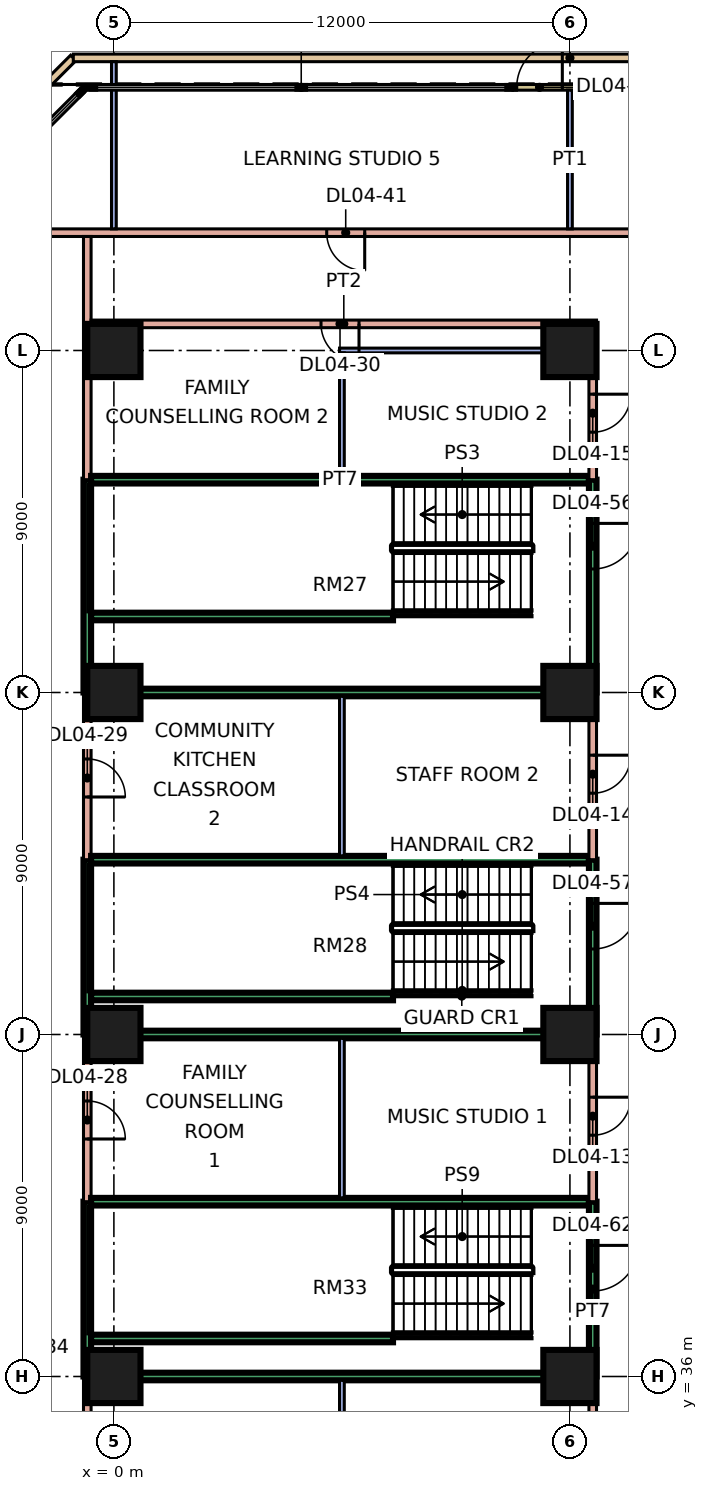
"""IFC4 building model, lengths in metres.
Left out: names, types, materials, properties, quantities, classifications, styles, units other than length and angle.
Written with IfcOpenShell. Run it as: python <this file> out.ifc"""

import sys

from ifc_helpers import new_model, si_unit, direction, frame, frame_2d, origin, origin_2d, place, context, subcontext, project, spatial, rectangle, extrude, element, fill, save


model = new_model("IFC4")
c1 = context("Model", 3, precision=1e-05, world=origin(), true_north=direction((0.0, 1.0)))
c2 = subcontext(c1, "Body", "Model", "MODEL_VIEW")
j1 = project(units=[si_unit("LENGTHUNIT", "METRE"), si_unit("PLANEANGLEUNIT", "RADIAN")], contexts=[c1])
p1 = place(None, origin())
s1 = spatial("IfcSite", under=j1, at=p1, CompositionType="ELEMENT")
p2 = place(p1, origin())
s2 = spatial("IfcBuilding", under=s1, at=p2, CompositionType="ELEMENT")
p3 = place(p2, frame((0.0, 0.0, 21.6)))
s3 = spatial("IfcBuildingStorey", under=s2, at=p3, CompositionType="ELEMENT", Elevation=21.6)
for number, where, z_axis, x_axis in (
    (1, (0.0, 36.0, 0.0), (0.0, 0.0, 1.0), (1.0, 0.0, 0.0)),
    (2, (12.0, 36.0, 0.0), (0.0, 0.0, 1.0), (1.0, 0.0, 0.0)),
    (3, (0.0, 45.0, 0.0), (0.0, 0.0, 1.0), (1.0, 0.0, 0.0)),
    (4, (12.0, 45.0, 0.0), (0.0, 0.0, 1.0), (1.0, 0.0, 0.0)),
    (5, (0.0, 54.0, 0.0), (0.0, 0.0, 1.0), (1.0, 0.0, 0.0)),
    (6, (12.0, 54.0, 0.0), (0.0, 0.0, 1.0), (1.0, 0.0, 0.0)),
    (7, (0.0, 63.0, 0.0), (0.0, 0.0, 1.0), (1.0, 0.0, 0.0)),
    (8, (12.0, 63.0, 0.0), (0.0, 0.0, 1.0), (1.0, 0.0, 0.0)),
):
    element("IfcColumn", number, at=place(p3, frame(where, z_axis=z_axis, x_axis=x_axis)), inside=s3, PredefinedType="COLUMN", context=c2, shape_type="SweptSolid", body=[
        extrude(rectangle(XDim=1.4, YDim=1.4, at=origin_2d()), origin(), (0.0, 0.0, 1.0), 4.8),
    ])
p4 = place(p3, frame((13.5, 69.925, 0.0), z_axis=(0.0, 0.0, 1.0), x_axis=(-1.0, 0.0, 0.0)))
e9 = element("IfcWall", 9, at=p4, inside=s3, PredefinedType="SOLIDWALL", context=c2, shape_type="SweptSolid", body=[
    extrude(rectangle(XDim=3.0, YDim=0.15, at=frame_2d((1.5, 0.0))), origin(), (0.0, 0.0, 1.0), 4.4),
])
p5 = place(p4, frame((1.7, 0.0, 0.0)))
e10 = element("IfcOpeningElement", 10, at=p5, cuts=e9, PredefinedType="OPENING", context=c2, shape_type="SweptSolid", body=[
    extrude(rectangle(XDim=1.2, YDim=2.4, at=frame_2d((0.6, 1.2))), frame((0.0, 0.085, 0.0), z_axis=(0.0, -1.0, 0.0), x_axis=(1.0, 0.0, 0.0)), (0.0, 0.0, 1.0), 0.17),
])
p6 = place(p3, frame((-7.7, 64.068, 0.0), z_axis=(0.0, 0.0, 1.0), x_axis=(0.707106781187, 0.707106781187, 0.0)))
e11 = element("IfcWall", 11, at=p6, inside=s3, PredefinedType="PARAPET", context=c2, shape_type="SweptSolid", body=[
    extrude(rectangle(XDim=9.379, YDim=0.2, at=frame_2d((4.689, 0.0))), origin(), (0.0, 0.0, 1.0), 0.5),
])
p7 = place(p3, frame((-1.068, 70.7, 0.0), z_axis=(0.0, 0.0, 1.0), x_axis=(1.0, 0.0, 0.0)))
e12 = element("IfcWall", 12, at=p7, inside=s3, PredefinedType="PARAPET", context=c2, shape_type="SweptSolid", body=[
    extrude(rectangle(XDim=26.136, YDim=0.2, at=frame_2d((13.068, 0.0))), origin(), (0.0, 0.0, 1.0), 0.5),
])
p8 = place(p3, frame((-3.0, 66.1, 0.0), z_axis=(0.0, 0.0, 1.0), x_axis=(1.0, 0.0, 0.0)))
e13 = element("IfcWall", 13, at=p8, inside=s3, PredefinedType="PARTITIONING", context=c2, shape_type="SweptSolid", body=[
    extrude(rectangle(XDim=30.0, YDim=0.2, at=frame_2d((15.0, 0.0))), origin(), (0.0, 0.0, 1.0), 4.4),
])
p9 = place(p8, frame((8.6, 0.0, 0.0)))
e14 = element("IfcOpeningElement", 14, at=p9, cuts=e13, PredefinedType="OPENING", context=c2, shape_type="SweptSolid", body=[
    extrude(rectangle(XDim=1.0, YDim=2.1, at=frame_2d((0.5, 1.05))), frame((0.0, 0.11, 0.0), z_axis=(0.0, -1.0, 0.0), x_axis=(1.0, 0.0, 0.0)), (0.0, 0.0, 1.0), 0.22),
])
p10 = place(p8, frame((22.35, 0.0, 0.0)))
e15 = element("IfcOpeningElement", 15, at=p10, cuts=e13, PredefinedType="OPENING", context=c2, shape_type="SweptSolid", body=[
    extrude(rectangle(XDim=1.0, YDim=2.1, at=frame_2d((0.5, 1.05))), frame((0.0, 0.11, 0.0), z_axis=(0.0, -1.0, 0.0), x_axis=(1.0, 0.0, 0.0)), (0.0, 0.0, 1.0), 0.22),
])
p11 = place(p3, frame((-0.7, 29.6, 0.0), z_axis=(0.0, 0.0, 1.0), x_axis=(0.0, 1.0, 0.0)))
e16 = element("IfcWall", 16, at=p11, inside=s3, PredefinedType="PARTITIONING", context=c2, shape_type="SweptSolid", body=[
    extrude(rectangle(XDim=6.4, YDim=0.2, at=frame_2d((3.2, 0.0))), origin(), (0.0, 0.0, 1.0), 4.4),
])
p12 = place(p11, frame((2.65, 0.0, 0.0)))
e17 = element("IfcOpeningElement", 17, at=p12, cuts=e16, PredefinedType="OPENING", context=c2, shape_type="SweptSolid", body=[
    extrude(rectangle(XDim=1.0, YDim=2.1, at=frame_2d((0.5, 1.05))), frame((0.0, 0.11, 0.0), z_axis=(0.0, -1.0, 0.0), x_axis=(1.0, 0.0, 0.0)), (0.0, 0.0, 1.0), 0.22),
])
p13 = place(p3, frame((-0.7, 36.0, 0.0), z_axis=(0.0, 0.0, 1.0), x_axis=(0.0, 1.0, 0.0)))
e18 = element("IfcWall", 18, at=p13, inside=s3, PredefinedType="SOLIDWALL", context=c2, shape_type="SweptSolid", body=[
    extrude(rectangle(XDim=4.6, YDim=0.2, at=frame_2d((2.3, 0.0))), origin(), (0.0, 0.0, 1.0), 4.4),
])
p14 = place(p3, frame((-0.7, 40.6, 0.0), z_axis=(0.0, 0.0, 1.0), x_axis=(0.0, 1.0, 0.0)))
e19 = element("IfcWall", 19, at=p14, inside=s3, PredefinedType="PARTITIONING", context=c2, shape_type="SweptSolid", body=[
    extrude(rectangle(XDim=4.4, YDim=0.2, at=frame_2d((2.2, 0.0))), origin(), (0.0, 0.0, 1.0), 4.4),
])
p15 = place(p14, frame((1.65, 0.0, 0.0)))
e20 = element("IfcOpeningElement", 20, at=p15, cuts=e19, PredefinedType="OPENING", context=c2, shape_type="SweptSolid", body=[
    extrude(rectangle(XDim=1.0, YDim=2.1, at=frame_2d((0.5, 1.05))), frame((0.0, 0.11, 0.0), z_axis=(0.0, -1.0, 0.0), x_axis=(1.0, 0.0, 0.0)), (0.0, 0.0, 1.0), 0.22),
])
p16 = place(p3, frame((-0.7, 45.0, 0.0), z_axis=(0.0, 0.0, 1.0), x_axis=(0.0, 1.0, 0.0)))
e21 = element("IfcWall", 21, at=p16, inside=s3, PredefinedType="SOLIDWALL", context=c2, shape_type="SweptSolid", body=[
    extrude(rectangle(XDim=4.6, YDim=0.2, at=frame_2d((2.3, 0.0))), origin(), (0.0, 0.0, 1.0), 4.4),
])
p17 = place(p3, frame((-0.7, 49.6, 0.0), z_axis=(0.0, 0.0, 1.0), x_axis=(0.0, 1.0, 0.0)))
e22 = element("IfcWall", 22, at=p17, inside=s3, PredefinedType="PARTITIONING", context=c2, shape_type="SweptSolid", body=[
    extrude(rectangle(XDim=4.4, YDim=0.2, at=frame_2d((2.2, 0.0))), origin(), (0.0, 0.0, 1.0), 4.4),
])
p18 = place(p17, frame((1.65, 0.0, 0.0)))
e23 = element("IfcOpeningElement", 23, at=p18, cuts=e22, PredefinedType="OPENING", context=c2, shape_type="SweptSolid", body=[
    extrude(rectangle(XDim=1.0, YDim=2.1, at=frame_2d((0.5, 1.05))), frame((0.0, 0.11, 0.0), z_axis=(0.0, -1.0, 0.0), x_axis=(1.0, 0.0, 0.0)), (0.0, 0.0, 1.0), 0.22),
])
p19 = place(p3, frame((-0.7, 54.0, 0.0), z_axis=(0.0, 0.0, 1.0), x_axis=(0.0, 1.0, 0.0)))
e24 = element("IfcWall", 24, at=p19, inside=s3, PredefinedType="SOLIDWALL", context=c2, shape_type="SweptSolid", body=[
    extrude(rectangle(XDim=5.6, YDim=0.2, at=frame_2d((2.8, 0.0))), origin(), (0.0, 0.0, 1.0), 4.4),
])
p20 = place(p3, frame((-0.7, 59.6, 0.0), z_axis=(0.0, 0.0, 1.0), x_axis=(0.0, 1.0, 0.0)))
e25 = element("IfcWall", 25, at=p20, inside=s3, PredefinedType="PARTITIONING", context=c2, shape_type="SweptSolid", body=[
    extrude(rectangle(XDim=6.4, YDim=0.2, at=frame_2d((3.2, 0.0))), origin(), (0.0, 0.0, 1.0), 4.4),
])
for number, where, z_axis, x_axis in (
    (26, (-0.6, 36.0, 0.0), (0.0, 0.0, 1.0), (1.0, 0.0, 0.0)),
    (27, (-0.6, 40.6, 0.0), (0.0, 0.0, 1.0), (1.0, 0.0, 0.0)),
    (28, (-0.6, 45.0, 0.0), (0.0, 0.0, 1.0), (1.0, 0.0, 0.0)),
    (29, (-0.6, 49.6, 0.0), (0.0, 0.0, 1.0), (1.0, 0.0, 0.0)),
    (30, (-0.6, 54.0, 0.0), (0.0, 0.0, 1.0), (1.0, 0.0, 0.0)),
    (31, (-0.6, 59.6, 0.0), (0.0, 0.0, 1.0), (1.0, 0.0, 0.0)),
):
    element("IfcWall", number, at=place(p3, frame(where, z_axis=z_axis, x_axis=x_axis)), inside=s3, PredefinedType="SOLIDWALL", context=c2, shape_type="SweptSolid", body=[
        extrude(rectangle(XDim=13.1, YDim=0.2, at=frame_2d((6.55, 0.0))), origin(), (0.0, 0.0, 1.0), 4.4),
    ])
p21 = place(p3, frame((-0.6, 63.7, 0.0), z_axis=(0.0, 0.0, 1.0), x_axis=(1.0, 0.0, 0.0)))
e32 = element("IfcWall", 32, at=p21, inside=s3, PredefinedType="PARTITIONING", context=c2, shape_type="SweptSolid", body=[
    extrude(rectangle(XDim=13.3, YDim=0.2, at=frame_2d((6.65, 0.0))), origin(), (0.0, 0.0, 1.0), 4.4),
])
p22 = place(p21, frame((6.05, 0.0, 0.0)))
e33 = element("IfcOpeningElement", 33, at=p22, cuts=e32, PredefinedType="OPENING", context=c2, shape_type="SweptSolid", body=[
    extrude(rectangle(XDim=1.0, YDim=2.1, at=frame_2d((0.5, 1.05))), frame((0.0, 0.11, 0.0), z_axis=(0.0, -1.0, 0.0), x_axis=(1.0, 0.0, 0.0)), (0.0, 0.0, 1.0), 0.22),
])
p23 = place(p3, frame((0.0, 66.2, 0.0), z_axis=(0.0, 0.0, 1.0), x_axis=(0.0, 1.0, 0.0)))
e34 = element("IfcWall", 34, at=p23, inside=s3, PredefinedType="PARTITIONING", context=c2, shape_type="SweptSolid", body=[
    extrude(rectangle(XDim=4.4, YDim=0.125, at=frame_2d((2.2, 0.0))), origin(), (0.0, 0.0, 1.0), 4.4),
])
p24 = place(p3, frame((5.938, 63.0, 0.0), z_axis=(0.0, 0.0, 1.0), x_axis=(1.0, 0.0, 0.0)))
e35 = element("IfcWall", 35, at=p24, inside=s3, PredefinedType="PARTITIONING", context=c2, shape_type="SweptSolid", body=[
    extrude(rectangle(XDim=6.562, YDim=0.125, at=frame_2d((3.281, 0.0))), origin(), (0.0, 0.0, 1.0), 4.4),
])
p25 = place(p3, frame((6.0, 29.7, 0.0), z_axis=(0.0, 0.0, 1.0), x_axis=(0.0, 1.0, 0.0)))
e36 = element("IfcWall", 36, at=p25, inside=s3, PredefinedType="PARTITIONING", context=c2, shape_type="SweptSolid", body=[
    extrude(rectangle(XDim=6.2, YDim=0.125, at=frame_2d((3.1, 0.0))), origin(), (0.0, 0.0, 1.0), 4.4),
])
for number, where, z_axis, x_axis in (
    (37, (6.0, 40.7, 0.0), (0.0, 0.0, 1.0), (0.0, 1.0, 0.0)),
    (38, (6.0, 49.7, 0.0), (0.0, 0.0, 1.0), (0.0, 1.0, 0.0)),
):
    element("IfcWall", number, at=place(p3, frame(where, z_axis=z_axis, x_axis=x_axis)), inside=s3, PredefinedType="PARTITIONING", context=c2, shape_type="SweptSolid", body=[
        extrude(rectangle(XDim=4.2, YDim=0.125, at=frame_2d((2.1, 0.0))), origin(), (0.0, 0.0, 1.0), 4.4),
    ])
p26 = place(p3, frame((6.0, 59.7, 0.0), z_axis=(0.0, 0.0, 1.0), x_axis=(0.0, 1.0, 0.0)))
e39 = element("IfcWall", 39, at=p26, inside=s3, PredefinedType="PARTITIONING", context=c2, shape_type="SweptSolid", body=[
    extrude(rectangle(XDim=3.238, YDim=0.125, at=frame_2d((1.619, 0.0))), origin(), (0.0, 0.0, 1.0), 4.4),
])
p27 = place(p3, frame((12.0, 66.2, 0.0), z_axis=(0.0, 0.0, 1.0), x_axis=(0.0, 1.0, 0.0)))
e40 = element("IfcWall", 40, at=p27, inside=s3, PredefinedType="PARTITIONING", context=c2, shape_type="SweptSolid", body=[
    extrude(rectangle(XDim=3.651, YDim=0.125, at=frame_2d((1.826, 0.0))), origin(), (0.0, 0.0, 1.0), 4.4),
])
p28 = place(p3, frame((12.6, 29.6, 0.0), z_axis=(0.0, 0.0, 1.0), x_axis=(0.0, 1.0, 0.0)))
e41 = element("IfcWall", 41, at=p28, inside=s3, PredefinedType="PARTITIONING", context=c2, shape_type="SweptSolid", body=[
    extrude(rectangle(XDim=6.4, YDim=0.2, at=frame_2d((3.2, 0.0))), origin(), (0.0, 0.0, 1.0), 4.4),
])
p29 = place(p28, frame((2.75, 0.0, 0.0)))
e42 = element("IfcOpeningElement", 42, at=p29, cuts=e41, PredefinedType="OPENING", context=c2, shape_type="SweptSolid", body=[
    extrude(rectangle(XDim=1.0, YDim=2.1, at=frame_2d((0.5, 1.05))), frame((0.0, 0.11, 0.0), z_axis=(0.0, -1.0, 0.0), x_axis=(1.0, 0.0, 0.0)), (0.0, 0.0, 1.0), 0.22),
])
p30 = place(p3, frame((12.6, 36.0, 0.0), z_axis=(0.0, 0.0, 1.0), x_axis=(0.0, 1.0, 0.0)))
e43 = element("IfcWall", 43, at=p30, inside=s3, PredefinedType="SOLIDWALL", context=c2, shape_type="SweptSolid", body=[
    extrude(rectangle(XDim=4.6, YDim=0.2, at=frame_2d((2.3, 0.0))), origin(), (0.0, 0.0, 1.0), 4.4),
])
p31 = place(p30, frame((2.25, 0.0, 0.0)))
e44 = element("IfcOpeningElement", 44, at=p31, cuts=e43, PredefinedType="OPENING", context=c2, shape_type="SweptSolid", body=[
    extrude(rectangle(XDim=1.2, YDim=2.1, at=frame_2d((0.6, 1.05))), frame((0.0, 0.11, 0.0), z_axis=(0.0, -1.0, 0.0), x_axis=(1.0, 0.0, 0.0)), (0.0, 0.0, 1.0), 0.22),
])
p32 = place(p3, frame((12.6, 40.6, 0.0), z_axis=(0.0, 0.0, 1.0), x_axis=(0.0, 1.0, 0.0)))
e45 = element("IfcWall", 45, at=p32, inside=s3, PredefinedType="PARTITIONING", context=c2, shape_type="SweptSolid", body=[
    extrude(rectangle(XDim=4.4, YDim=0.2, at=frame_2d((2.2, 0.0))), origin(), (0.0, 0.0, 1.0), 4.4),
])
p33 = place(p32, frame((1.75, 0.0, 0.0)))
e46 = element("IfcOpeningElement", 46, at=p33, cuts=e45, PredefinedType="OPENING", context=c2, shape_type="SweptSolid", body=[
    extrude(rectangle(XDim=1.0, YDim=2.1, at=frame_2d((0.5, 1.05))), frame((0.0, 0.11, 0.0), z_axis=(0.0, -1.0, 0.0), x_axis=(1.0, 0.0, 0.0)), (0.0, 0.0, 1.0), 0.22),
])
p34 = place(p3, frame((12.6, 45.0, 0.0), z_axis=(0.0, 0.0, 1.0), x_axis=(0.0, 1.0, 0.0)))
e47 = element("IfcWall", 47, at=p34, inside=s3, PredefinedType="SOLIDWALL", context=c2, shape_type="SweptSolid", body=[
    extrude(rectangle(XDim=4.6, YDim=0.2, at=frame_2d((2.3, 0.0))), origin(), (0.0, 0.0, 1.0), 4.4),
])
p35 = place(p34, frame((2.25, 0.0, 0.0)))
e48 = element("IfcOpeningElement", 48, at=p35, cuts=e47, PredefinedType="OPENING", context=c2, shape_type="SweptSolid", body=[
    extrude(rectangle(XDim=1.2, YDim=2.1, at=frame_2d((0.6, 1.05))), frame((0.0, 0.11, 0.0), z_axis=(0.0, -1.0, 0.0), x_axis=(1.0, 0.0, 0.0)), (0.0, 0.0, 1.0), 0.22),
])
p36 = place(p3, frame((12.6, 49.6, 0.0), z_axis=(0.0, 0.0, 1.0), x_axis=(0.0, 1.0, 0.0)))
e49 = element("IfcWall", 49, at=p36, inside=s3, PredefinedType="PARTITIONING", context=c2, shape_type="SweptSolid", body=[
    extrude(rectangle(XDim=4.4, YDim=0.2, at=frame_2d((2.2, 0.0))), origin(), (0.0, 0.0, 1.0), 4.4),
])
p37 = place(p36, frame((1.75, 0.0, 0.0)))
e50 = element("IfcOpeningElement", 50, at=p37, cuts=e49, PredefinedType="OPENING", context=c2, shape_type="SweptSolid", body=[
    extrude(rectangle(XDim=1.0, YDim=2.1, at=frame_2d((0.5, 1.05))), frame((0.0, 0.11, 0.0), z_axis=(0.0, -1.0, 0.0), x_axis=(1.0, 0.0, 0.0)), (0.0, 0.0, 1.0), 0.22),
])
p38 = place(p3, frame((12.6, 54.0, 0.0), z_axis=(0.0, 0.0, 1.0), x_axis=(0.0, 1.0, 0.0)))
e51 = element("IfcWall", 51, at=p38, inside=s3, PredefinedType="SOLIDWALL", context=c2, shape_type="SweptSolid", body=[
    extrude(rectangle(XDim=5.6, YDim=0.2, at=frame_2d((2.8, 0.0))), origin(), (0.0, 0.0, 1.0), 4.4),
])
p39 = place(p38, frame((3.25, 0.0, 0.0)))
e52 = element("IfcOpeningElement", 52, at=p39, cuts=e51, PredefinedType="OPENING", context=c2, shape_type="SweptSolid", body=[
    extrude(rectangle(XDim=1.2, YDim=2.1, at=frame_2d((0.6, 1.05))), frame((0.0, 0.11, 0.0), z_axis=(0.0, -1.0, 0.0), x_axis=(1.0, 0.0, 0.0)), (0.0, 0.0, 1.0), 0.22),
])
p40 = place(p3, frame((12.6, 59.6, 0.0), z_axis=(0.0, 0.0, 1.0), x_axis=(0.0, 1.0, 0.0)))
e53 = element("IfcWall", 53, at=p40, inside=s3, PredefinedType="PARTITIONING", context=c2, shape_type="SweptSolid", body=[
    extrude(rectangle(XDim=4.0, YDim=0.2, at=frame_2d((2.0, 0.0))), origin(), (0.0, 0.0, 1.0), 4.4),
])
p41 = place(p40, frame((1.25, 0.0, 0.0)))
e54 = element("IfcOpeningElement", 54, at=p41, cuts=e53, PredefinedType="OPENING", context=c2, shape_type="SweptSolid", body=[
    extrude(rectangle(XDim=1.0, YDim=2.1, at=frame_2d((0.5, 1.05))), frame((0.0, 0.11, 0.0), z_axis=(0.0, -1.0, 0.0), x_axis=(1.0, 0.0, 0.0)), (0.0, 0.0, 1.0), 0.22),
])
for number, where, z_axis, x_axis in (
    (55, (-0.6, 56.0, 0.0), (0.0, 0.0, 1.0), (1.0, 0.0, 0.0)),
    (56, (-0.6, 46.0, 0.0), (0.0, 0.0, 1.0), (1.0, 0.0, 0.0)),
    (57, (-0.6, 37.0, 0.0), (0.0, 0.0, 1.0), (1.0, 0.0, 0.0)),
):
    element("IfcWall", number, at=place(p3, frame(where, z_axis=z_axis, x_axis=x_axis)), inside=s3, PredefinedType="SOLIDWALL", context=c2, shape_type="SweptSolid", body=[
        extrude(rectangle(XDim=7.945, YDim=0.2, at=frame_2d((3.973, 0.0))), origin(), (0.0, 0.0, 1.0), 4.4),
    ])
p42 = place(p5, frame((1.2, 0.0, 0.0), z_axis=(0.0, 0.0, 1.0), x_axis=(-1.0, 0.0, 0.0)))
e58 = element("IfcDoor", 58, at=p42, inside=s3, OperationType="DOUBLE_DOOR_SINGLE_SWING", PredefinedType="DOOR", context=c2, shape_type="SweptSolid", body=[
    extrude(rectangle(XDim=1.2, YDim=2.4, at=frame_2d((0.6, 1.2))), frame((0.0, 0.025, 0.0), z_axis=(0.0, -1.0, 0.0), x_axis=(1.0, 0.0, 0.0)), (0.0, 0.0, 1.0), 0.05),
])
fill(e10, e58)
p43 = place(p33, origin())
e59 = element("IfcDoor", 59, at=p43, inside=s3, OperationType="SINGLE_SWING_RIGHT", PredefinedType="DOOR", context=c2, shape_type="SweptSolid", body=[
    extrude(rectangle(XDim=1.0, YDim=2.1, at=frame_2d((0.5, 1.05))), frame((0.0, 0.025, 0.0), z_axis=(0.0, -1.0, 0.0), x_axis=(1.0, 0.0, 0.0)), (0.0, 0.0, 1.0), 0.05),
])
fill(e46, e59)
p44 = place(p37, origin())
e60 = element("IfcDoor", 60, at=p44, inside=s3, OperationType="SINGLE_SWING_RIGHT", PredefinedType="DOOR", context=c2, shape_type="SweptSolid", body=[
    extrude(rectangle(XDim=1.0, YDim=2.1, at=frame_2d((0.5, 1.05))), frame((0.0, 0.025, 0.0), z_axis=(0.0, -1.0, 0.0), x_axis=(1.0, 0.0, 0.0)), (0.0, 0.0, 1.0), 0.05),
])
fill(e50, e60)
p45 = place(p41, origin())
e61 = element("IfcDoor", 61, at=p45, inside=s3, OperationType="SINGLE_SWING_RIGHT", PredefinedType="DOOR", context=c2, shape_type="SweptSolid", body=[
    extrude(rectangle(XDim=1.0, YDim=2.1, at=frame_2d((0.5, 1.05))), frame((0.0, 0.025, 0.0), z_axis=(0.0, -1.0, 0.0), x_axis=(1.0, 0.0, 0.0)), (0.0, 0.0, 1.0), 0.05),
])
fill(e54, e61)
p46 = place(p15, frame((1.0, 0.0, 0.0), z_axis=(0.0, 0.0, 1.0), x_axis=(-1.0, 0.0, 0.0)))
e62 = element("IfcDoor", 62, at=p46, inside=s3, OperationType="SINGLE_SWING_LEFT", PredefinedType="DOOR", context=c2, shape_type="SweptSolid", body=[
    extrude(rectangle(XDim=1.0, YDim=2.1, at=frame_2d((0.5, 1.05))), frame((0.0, 0.025, 0.0), z_axis=(0.0, -1.0, 0.0), x_axis=(1.0, 0.0, 0.0)), (0.0, 0.0, 1.0), 0.05),
])
fill(e20, e62)
p47 = place(p18, frame((1.0, 0.0, 0.0), z_axis=(0.0, 0.0, 1.0), x_axis=(-1.0, 0.0, 0.0)))
e63 = element("IfcDoor", 63, at=p47, inside=s3, OperationType="SINGLE_SWING_LEFT", PredefinedType="DOOR", context=c2, shape_type="SweptSolid", body=[
    extrude(rectangle(XDim=1.0, YDim=2.1, at=frame_2d((0.5, 1.05))), frame((0.0, 0.025, 0.0), z_axis=(0.0, -1.0, 0.0), x_axis=(1.0, 0.0, 0.0)), (0.0, 0.0, 1.0), 0.05),
])
fill(e23, e63)
p48 = place(p22, origin())
e64 = element("IfcDoor", 64, at=p48, inside=s3, OperationType="SINGLE_SWING_RIGHT", PredefinedType="DOOR", context=c2, shape_type="SweptSolid", body=[
    extrude(rectangle(XDim=1.0, YDim=2.1, at=frame_2d((0.5, 1.05))), frame((0.0, 0.025, 0.0), z_axis=(0.0, -1.0, 0.0), x_axis=(1.0, 0.0, 0.0)), (0.0, 0.0, 1.0), 0.05),
])
fill(e33, e64)
p49 = place(p9, origin())
e65 = element("IfcDoor", 65, at=p49, inside=s3, OperationType="SINGLE_SWING_RIGHT", PredefinedType="DOOR", context=c2, shape_type="SweptSolid", body=[
    extrude(rectangle(XDim=1.0, YDim=2.1, at=frame_2d((0.5, 1.05))), frame((0.0, 0.025, 0.0), z_axis=(0.0, -1.0, 0.0), x_axis=(1.0, 0.0, 0.0)), (0.0, 0.0, 1.0), 0.05),
])
fill(e14, e65)
p50 = place(p39, origin())
e66 = element("IfcDoor", 66, at=p50, inside=s3, OperationType="SINGLE_SWING_RIGHT", PredefinedType="DOOR", context=c2, shape_type="SweptSolid", body=[
    extrude(rectangle(XDim=1.2, YDim=2.1, at=frame_2d((0.6, 1.05))), frame((0.0, 0.025, 0.0), z_axis=(0.0, -1.0, 0.0), x_axis=(1.0, 0.0, 0.0)), (0.0, 0.0, 1.0), 0.05),
])
fill(e52, e66)
p51 = place(p35, origin())
e67 = element("IfcDoor", 67, at=p51, inside=s3, OperationType="SINGLE_SWING_RIGHT", PredefinedType="DOOR", context=c2, shape_type="SweptSolid", body=[
    extrude(rectangle(XDim=1.2, YDim=2.1, at=frame_2d((0.6, 1.05))), frame((0.0, 0.025, 0.0), z_axis=(0.0, -1.0, 0.0), x_axis=(1.0, 0.0, 0.0)), (0.0, 0.0, 1.0), 0.05),
])
fill(e48, e67)
p52 = place(p31, origin())
e68 = element("IfcDoor", 68, at=p52, inside=s3, OperationType="SINGLE_SWING_RIGHT", PredefinedType="DOOR", context=c2, shape_type="SweptSolid", body=[
    extrude(rectangle(XDim=1.2, YDim=2.1, at=frame_2d((0.6, 1.05))), frame((0.0, 0.025, 0.0), z_axis=(0.0, -1.0, 0.0), x_axis=(1.0, 0.0, 0.0)), (0.0, 0.0, 1.0), 0.05),
])
fill(e44, e68)
save(model, sys.argv[1])
